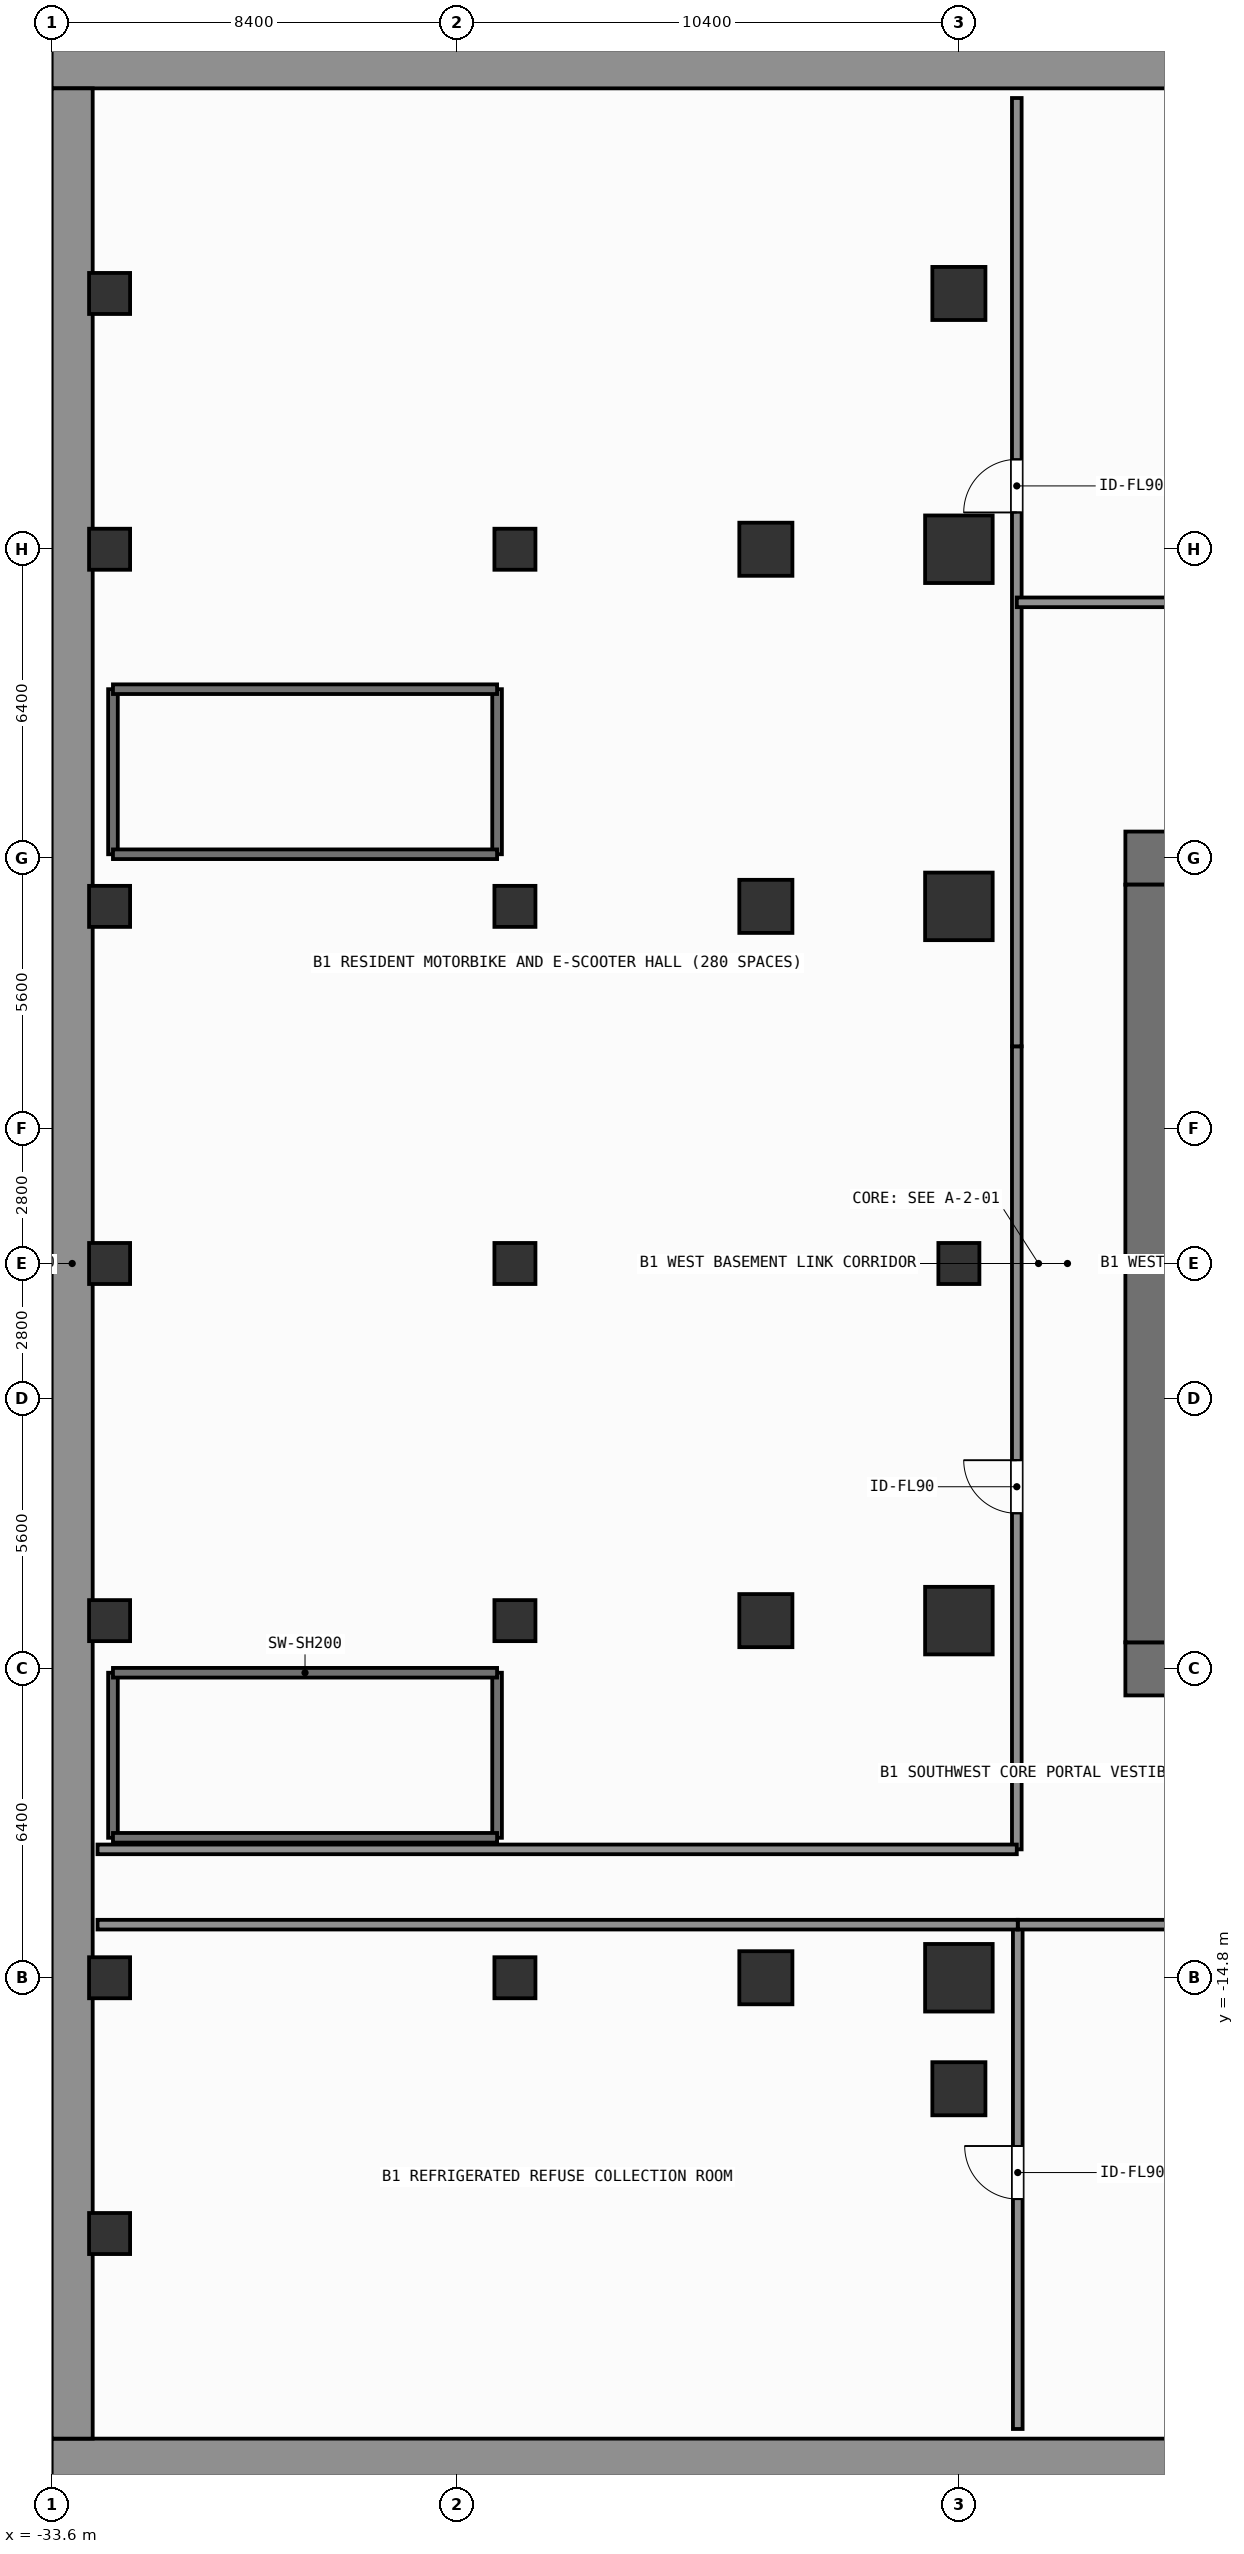
"""IFC4 building model, lengths in metres.
Left out: names, types, materials, properties, quantities, classifications, styles, units other than length and angle.
Written with IfcOpenShell. Run it as: python <this file> out.ifc"""

import sys

from ifc_helpers import new_model, si_unit, direction, frame, frame_2d, origin, origin_2d, place, context, subcontext, project, spatial, rectangle, extrude, element, fill, save


model = new_model("IFC4")
c1 = context("Model", 3, precision=1e-05, world=origin(), true_north=direction((0.0, 1.0)))
c2 = subcontext(c1, "Body", "Model", "MODEL_VIEW")
j1 = project(units=[si_unit("LENGTHUNIT", "METRE"), si_unit("PLANEANGLEUNIT", "RADIAN")], contexts=[c1])
p1 = place(None, origin())
s1 = spatial("IfcSite", under=j1, at=p1, CompositionType="ELEMENT")
p2 = place(p1, origin())
s2 = spatial("IfcBuilding", under=s1, at=p2, CompositionType="ELEMENT")
p3 = place(p2, frame((0.0, 0.0, -4.2)))
s3 = spatial("IfcBuildingStorey", under=s2, at=p3, CompositionType="ELEMENT", Elevation=-4.2)
for number, where, z_axis, x_axis in (
    (1, (-33.6, -24.775, 0.0), (0.0, 0.0, 1.0), (1.0, 0.0, 0.0)),
    (2, (-33.6, 24.775, 0.0), (0.0, 0.0, 1.0), (1.0, 0.0, 0.0)),
):
    element("IfcWall", number, at=place(p3, frame(where, z_axis=z_axis, x_axis=x_axis)), inside=s3, PredefinedType="SOLIDWALL", context=c2, shape_type="SweptSolid", body=[
        extrude(rectangle(XDim=67.2, YDim=0.85, at=frame_2d((33.6, 0.0))), origin(), (0.0, 0.0, 1.0), 4.2),
    ])
p4 = place(p3, frame((-33.175, -24.35, 0.0), z_axis=(0.0, 0.0, 1.0), x_axis=(0.0, 1.0, 0.0)))
e3 = element("IfcWall", 3, at=p4, inside=s3, PredefinedType="SOLIDWALL", context=c2, shape_type="SweptSolid", body=[
    extrude(rectangle(XDim=48.7, YDim=0.85, at=frame_2d((24.35, 0.0))), origin(), (0.0, 0.0, 1.0), 4.2),
])
for number, where, z_axis, x_axis in (
    (4, (-11.35, -8.4, 0.0), (0.0, 0.0, 1.0), (1.0, 0.0, 0.0)),
    (5, (-11.35, 8.4, 0.0), (0.0, 0.0, 1.0), (1.0, 0.0, 0.0)),
):
    element("IfcWall", number, at=place(p3, frame(where, z_axis=z_axis, x_axis=x_axis)), inside=s3, PredefinedType="SHEAR", context=c2, shape_type="SweptSolid", body=[
        extrude(rectangle(XDim=1.65, YDim=1.1, at=frame_2d((0.825, 0.0))), origin(), (0.0, 0.0, 1.0), 4.2),
    ])
p5 = place(p3, frame((-10.8, -7.85, 0.0), z_axis=(0.0, 0.0, 1.0), x_axis=(0.0, 1.0, 0.0)))
e6 = element("IfcWall", 6, at=p5, inside=s3, PredefinedType="SHEAR", context=c2, shape_type="SweptSolid", body=[
    extrude(rectangle(XDim=15.7, YDim=1.1, at=frame_2d((7.85, 0.0))), origin(), (0.0, 0.0, 1.0), 4.2),
])
for number, where, z_axis, x_axis in (
    (7, (-14.8, -14.8, 0.0), (0.0, 0.0, 1.0), (1.0, 0.0, 0.0)),
    (8, (-14.8, 14.8, 0.0), (0.0, 0.0, 1.0), (1.0, 0.0, 0.0)),
    (9, (-14.8, -7.4, 0.0), (0.0, 0.0, 1.0), (1.0, 0.0, 0.0)),
    (10, (-14.8, 7.4, 0.0), (0.0, 0.0, 1.0), (1.0, 0.0, 0.0)),
):
    element("IfcColumn", number, at=place(p3, frame(where, z_axis=z_axis, x_axis=x_axis)), inside=s3, PredefinedType="COLUMN", context=c2, shape_type="SweptSolid", body=[
        extrude(rectangle(XDim=1.4, YDim=1.4, at=origin_2d()), origin(), (0.0, 0.0, 1.0), 4.2),
    ])
for number, where, z_axis, x_axis in (
    (11, (-18.8, -14.8, 0.0), (0.0, 0.0, 1.0), (1.0, 0.0, 0.0)),
    (12, (-18.8, -7.4, 0.0), (0.0, 0.0, 1.0), (1.0, 0.0, 0.0)),
    (13, (-18.8, 7.4, 0.0), (0.0, 0.0, 1.0), (1.0, 0.0, 0.0)),
    (14, (-18.8, 14.8, 0.0), (0.0, 0.0, 1.0), (1.0, 0.0, 0.0)),
    (15, (-14.8, -17.1, 0.0), (0.0, 0.0, 1.0), (1.0, 0.0, 0.0)),
    (16, (-14.8, 20.1, 0.0), (0.0, 0.0, 1.0), (1.0, 0.0, 0.0)),
):
    element("IfcColumn", number, at=place(p3, frame(where, z_axis=z_axis, x_axis=x_axis)), inside=s3, PredefinedType="COLUMN", context=c2, shape_type="SweptSolid", body=[
        extrude(rectangle(XDim=1.1, YDim=1.1, at=origin_2d()), origin(), (0.0, 0.0, 1.0), 4.2),
    ])
for number, where, z_axis, x_axis in (
    (17, (-32.4, -14.8, 0.0), (0.0, 0.0, 1.0), (1.0, 0.0, 0.0)),
    (18, (-32.4, -7.4, 0.0), (0.0, 0.0, 1.0), (1.0, 0.0, 0.0)),
    (19, (-32.4, 0.0, 0.0), (0.0, 0.0, 1.0), (1.0, 0.0, 0.0)),
    (20, (-32.4, 7.4, 0.0), (0.0, 0.0, 1.0), (1.0, 0.0, 0.0)),
    (21, (-32.4, 14.8, 0.0), (0.0, 0.0, 1.0), (1.0, 0.0, 0.0)),
    (22, (-24.0, -14.8, 0.0), (0.0, 0.0, 1.0), (1.0, 0.0, 0.0)),
    (23, (-24.0, -7.4, 0.0), (0.0, 0.0, 1.0), (1.0, 0.0, 0.0)),
    (24, (-24.0, 0.0, 0.0), (0.0, 0.0, 1.0), (1.0, 0.0, 0.0)),
    (25, (-24.0, 7.4, 0.0), (0.0, 0.0, 1.0), (1.0, 0.0, 0.0)),
    (26, (-24.0, 14.8, 0.0), (0.0, 0.0, 1.0), (1.0, 0.0, 0.0)),
    (27, (-14.8, 0.0, 0.0), (0.0, 0.0, 1.0), (1.0, 0.0, 0.0)),
    (28, (-32.4, -20.1, 0.0), (0.0, 0.0, 1.0), (1.0, 0.0, 0.0)),
    (29, (-32.4, 20.1, 0.0), (0.0, 0.0, 1.0), (1.0, 0.0, 0.0)),
):
    element("IfcColumn", number, at=place(p3, frame(where, z_axis=z_axis, x_axis=x_axis)), inside=s3, PredefinedType="COLUMN", context=c2, shape_type="SweptSolid", body=[
        extrude(rectangle(XDim=0.85, YDim=0.85, at=origin_2d()), origin(), (0.0, 0.0, 1.0), 4.2),
    ])
for number, where, z_axis, x_axis in (
    (30, (-32.33, -11.9, 0.0), (0.0, 0.0, 1.0), (0.0, 1.0, 0.0)),
    (31, (-24.37, -8.48, 0.0), (0.0, 0.0, 1.0), (0.0, -1.0, 0.0)),
):
    element("IfcWall", number, at=place(p3, frame(where, z_axis=z_axis, x_axis=x_axis)), inside=s3, PredefinedType="SHEAR", context=c2, shape_type="SweptSolid", body=[
        extrude(rectangle(XDim=3.42, YDim=0.2, at=frame_2d((1.71, 0.0))), origin(), (0.0, 0.0, 1.0), 3.9),
    ])
for number, where, z_axis, x_axis in (
    (32, (-24.37, -11.9, 0.0), (0.0, 0.0, 1.0), (-1.0, 0.0, 0.0)),
    (33, (-32.33, -8.48, 0.0), (0.0, 0.0, 1.0), (1.0, 0.0, 0.0)),
):
    element("IfcWall", number, at=place(p3, frame(where, z_axis=z_axis, x_axis=x_axis)), inside=s3, PredefinedType="SHEAR", context=c2, shape_type="SweptSolid", body=[
        extrude(rectangle(XDim=7.96, YDim=0.2, at=frame_2d((3.98, 0.0))), origin(), (0.0, 0.0, 1.0), 3.9),
    ])
for number, where, z_axis, x_axis in (
    (34, (-32.33, 8.48, 0.0), (0.0, 0.0, 1.0), (0.0, 1.0, 0.0)),
    (35, (-24.37, 11.9, 0.0), (0.0, 0.0, 1.0), (0.0, -1.0, 0.0)),
):
    element("IfcWall", number, at=place(p3, frame(where, z_axis=z_axis, x_axis=x_axis)), inside=s3, PredefinedType="SHEAR", context=c2, shape_type="SweptSolid", body=[
        extrude(rectangle(XDim=3.42, YDim=0.2, at=frame_2d((1.71, 0.0))), origin(), (0.0, 0.0, 1.0), 3.9),
    ])
for number, where, z_axis, x_axis in (
    (36, (-24.37, 8.48, 0.0), (0.0, 0.0, 1.0), (-1.0, 0.0, 0.0)),
    (37, (-32.33, 11.9, 0.0), (0.0, 0.0, 1.0), (1.0, 0.0, 0.0)),
):
    element("IfcWall", number, at=place(p3, frame(where, z_axis=z_axis, x_axis=x_axis)), inside=s3, PredefinedType="SHEAR", context=c2, shape_type="SweptSolid", body=[
        extrude(rectangle(XDim=7.96, YDim=0.2, at=frame_2d((3.98, 0.0))), origin(), (0.0, 0.0, 1.0), 3.9),
    ])
p6 = place(p3, frame((-13.6, -12.14, 0.0), z_axis=(0.0, 0.0, 1.0), x_axis=(0.0, 1.0, 0.0)))
e38 = element("IfcWall", 38, at=p6, inside=s3, PredefinedType="SOLIDWALL", context=c2, shape_type="SweptSolid", body=[
    extrude(rectangle(XDim=16.64, YDim=0.2, at=frame_2d((8.32, 0.0))), origin(), (0.0, 0.0, 1.0), 3.9),
])
p7 = place(p6, frame((6.964, 0.0, 0.0)))
e39 = element("IfcOpeningElement", 39, at=p7, cuts=e38, PredefinedType="OPENING", context=c2, shape_type="SweptSolid", body=[
    extrude(rectangle(XDim=1.1, YDim=2.15, at=frame_2d((0.55, 1.075))), frame((0.0, 0.11, 0.0), z_axis=(0.0, -1.0, 0.0), x_axis=(1.0, 0.0, 0.0)), (0.0, 0.0, 1.0), 0.22),
])
p8 = place(p3, frame((-13.6, 4.5, 0.0), z_axis=(0.0, 0.0, 1.0), x_axis=(0.0, 1.0, 0.0)))
e40 = element("IfcWall", 40, at=p8, inside=s3, PredefinedType="SOLIDWALL", context=c2, shape_type="SweptSolid", body=[
    extrude(rectangle(XDim=19.65, YDim=0.2, at=frame_2d((9.825, 0.0))), origin(), (0.0, 0.0, 1.0), 3.9),
])
p9 = place(p8, frame((11.062, 0.0, 0.0)))
e41 = element("IfcOpeningElement", 41, at=p9, cuts=e40, PredefinedType="OPENING", context=c2, shape_type="SweptSolid", body=[
    extrude(rectangle(XDim=1.1, YDim=2.15, at=frame_2d((0.55, 1.075))), frame((0.0, 0.11, 0.0), z_axis=(0.0, -1.0, 0.0), x_axis=(1.0, 0.0, 0.0)), (0.0, 0.0, 1.0), 0.22),
])
p10 = place(p3, frame((-13.6, 13.7, 0.0), z_axis=(0.0, 0.0, 1.0), x_axis=(1.0, 0.0, 0.0)))
e42 = element("IfcWall", 42, at=p10, inside=s3, PredefinedType="SOLIDWALL", context=c2, shape_type="SweptSolid", body=[
    extrude(rectangle(XDim=31.3, YDim=0.2, at=frame_2d((15.65, 0.0))), origin(), (0.0, 0.0, 1.0), 3.9),
])
p11 = place(p10, frame((14.38, 0.0, 0.0)))
e43 = element("IfcOpeningElement", 43, at=p11, cuts=e42, PredefinedType="OPENING", context=c2, shape_type="SweptSolid", body=[
    extrude(rectangle(XDim=1.1, YDim=2.15, at=frame_2d((0.55, 1.075))), frame((0.0, 0.11, 0.0), z_axis=(0.0, -1.0, 0.0), x_axis=(1.0, 0.0, 0.0)), (0.0, 0.0, 1.0), 0.22),
])
p12 = place(p3, frame((-13.58, -24.15, 0.0), z_axis=(0.0, 0.0, 1.0), x_axis=(0.0, 1.0, 0.0)))
e44 = element("IfcWall", 44, at=p12, inside=s3, PredefinedType="SOLIDWALL", context=c2, shape_type="SweptSolid", body=[
    extrude(rectangle(XDim=10.45, YDim=0.2, at=frame_2d((5.225, 0.0))), origin(), (0.0, 0.0, 1.0), 3.9),
])
p13 = place(p12, frame((4.763, 0.0, 0.0)))
e45 = element("IfcOpeningElement", 45, at=p13, cuts=e44, PredefinedType="OPENING", context=c2, shape_type="SweptSolid", body=[
    extrude(rectangle(XDim=1.1, YDim=2.15, at=frame_2d((0.55, 1.075))), frame((0.0, 0.11, 0.0), z_axis=(0.0, -1.0, 0.0), x_axis=(1.0, 0.0, 0.0)), (0.0, 0.0, 1.0), 0.22),
])
p14 = place(p3, frame((-13.58, -13.7, 0.0), z_axis=(0.0, 0.0, 1.0), x_axis=(1.0, 0.0, 0.0)))
e46 = element("IfcWall", 46, at=p14, inside=s3, PredefinedType="SOLIDWALL", context=c2, shape_type="SweptSolid", body=[
    extrude(rectangle(XDim=20.23, YDim=0.2, at=frame_2d((10.115, 0.0))), origin(), (0.0, 0.0, 1.0), 3.9),
])
p15 = place(p14, frame((8.58, 0.0, 0.0)))
e47 = element("IfcOpeningElement", 47, at=p15, cuts=e46, PredefinedType="OPENING", context=c2, shape_type="SweptSolid", body=[
    extrude(rectangle(XDim=1.1, YDim=2.15, at=frame_2d((0.55, 1.075))), frame((0.0, 0.11, 0.0), z_axis=(0.0, -1.0, 0.0), x_axis=(1.0, 0.0, 0.0)), (0.0, 0.0, 1.0), 0.22),
])
p16 = place(p3, frame((-32.65, -12.14, 0.0), z_axis=(0.0, 0.0, 1.0), x_axis=(1.0, 0.0, 0.0)))
e48 = element("IfcWall", 48, at=p16, inside=s3, PredefinedType="SOLIDWALL", context=c2, shape_type="SweptSolid", body=[
    extrude(rectangle(XDim=19.05, YDim=0.2, at=frame_2d((9.525, 0.0))), origin(), (0.0, 0.0, 1.0), 3.9),
])
p17 = place(p3, frame((-32.65, -13.7, 0.0), z_axis=(0.0, 0.0, 1.0), x_axis=(1.0, 0.0, 0.0)))
e49 = element("IfcWall", 49, at=p17, inside=s3, PredefinedType="SOLIDWALL", context=c2, shape_type="SweptSolid", body=[
    extrude(rectangle(XDim=19.07, YDim=0.2, at=frame_2d((9.535, 0.0))), origin(), (0.0, 0.0, 1.0), 3.9),
])
p18 = place(p7, origin())
e50 = element("IfcDoor", 50, at=p18, inside=s3, OperationType="SINGLE_SWING_RIGHT", PredefinedType="DOOR", context=c2, shape_type="SweptSolid", body=[
    extrude(rectangle(XDim=1.1, YDim=2.15, at=frame_2d((0.55, 1.075))), frame((0.0, 0.025, 0.0), z_axis=(0.0, -1.0, 0.0), x_axis=(1.0, 0.0, 0.0)), (0.0, 0.0, 1.0), 0.05),
])
fill(e39, e50)
p19 = place(p9, origin())
e51 = element("IfcDoor", 51, at=p19, inside=s3, OperationType="SINGLE_SWING_LEFT", PredefinedType="DOOR", context=c2, shape_type="SweptSolid", body=[
    extrude(rectangle(XDim=1.1, YDim=2.15, at=frame_2d((0.55, 1.075))), frame((0.0, 0.025, 0.0), z_axis=(0.0, -1.0, 0.0), x_axis=(1.0, 0.0, 0.0)), (0.0, 0.0, 1.0), 0.05),
])
fill(e41, e51)
p20 = place(p13, origin())
e52 = element("IfcDoor", 52, at=p20, inside=s3, OperationType="SINGLE_SWING_RIGHT", PredefinedType="DOOR", context=c2, shape_type="SweptSolid", body=[
    extrude(rectangle(XDim=1.1, YDim=2.15, at=frame_2d((0.55, 1.075))), frame((0.0, 0.025, 0.0), z_axis=(0.0, -1.0, 0.0), x_axis=(1.0, 0.0, 0.0)), (0.0, 0.0, 1.0), 0.05),
])
fill(e45, e52)
save(model, sys.argv[1])
